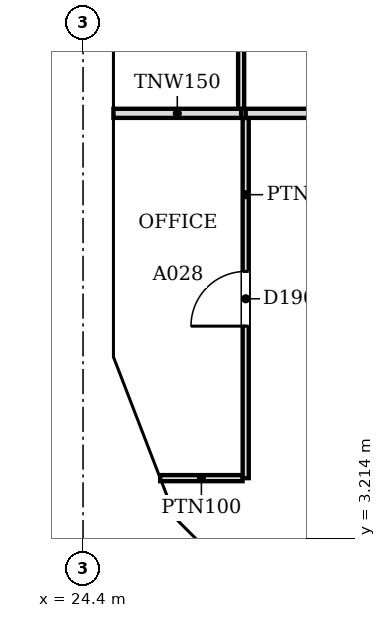
"""IFC4 building model, lengths in metres.
Left out: names, types, materials, properties, quantities, classifications, styles, units other than length and angle.
Written with IfcOpenShell. Run it as: python <this file> out.ifc"""

import sys

from ifc_helpers import new_model, si_unit, direction, frame, frame_2d, origin, place, context, subcontext, project, spatial, polyline, rectangle, outline, extrude, faceted_brep, source, transform, mapped, element, fill, save


model = new_model("IFC4")
c1 = context("Model", 3, precision=1e-05, world=origin(), true_north=direction((0.0, 1.0)))
c2 = subcontext(c1, "Body", "Model", "MODEL_VIEW")
j1 = project(units=[si_unit("LENGTHUNIT", "METRE"), si_unit("PLANEANGLEUNIT", "RADIAN")], contexts=[c1])
p1 = place(None, origin())
s1 = spatial("IfcSite", under=j1, at=p1, CompositionType="ELEMENT")
p2 = place(p1, origin())
s2 = spatial("IfcBuilding", under=s1, at=p2, CompositionType="ELEMENT")
p3 = place(p2, frame((0.0, 0.0, 25.8)))
s3 = spatial("IfcBuildingStorey", under=s2, at=p3, CompositionType="ELEMENT", Elevation=25.8)
m1 = source(origin(), c2, "Body", "Brep", [
    faceted_brep([(6.1, -0.25, 0.0), (3.096, -0.25, 3.8), (0.047, -0.25, 0.057), (0.047, -0.25, 0.0), (0.0, 0.25, 0.0), (3.096, 0.25, 3.8), (6.053, 0.25, 0.059), (6.053, 0.25, 0.0), (6.1, -0.0, 0.0), (0.0, 0.0, 0.0)], [[[0, 1, 2, 3]], [[4, 5, 6, 7]], [[6, 5, 1, 0, 8]], [[5, 4, 9, 2, 1]], [[4, 7, 8, 0, 3, 9]], [[9, 3, 2]], [[8, 7, 6]]]),
])
p4 = place(p3, frame((24.65, 12.247, 0.0), z_axis=(0.0, 0.0, 1.0), x_axis=(0.0, -1.0, 0.0)))
e1 = element("IfcWall", 1, at=p4, inside=s3, PredefinedType="SOLIDWALL", context=c2, shape_type="MappedRepresentation", body=[
    mapped(m1, transform((0.0, 0.0, 0.0), scale=1.0)),
])
m2 = source(origin(), c2, "Body", "SweptSolid", [
    extrude(outline(polyline([(5.584, 0.25), (3.094, 3.401), (0.526, 0.25), (5.584, 0.25)])), frame((0.0, 0.26, 0.0), z_axis=(0.0, -1.0, 0.0), x_axis=(1.0, 0.0, 0.0)), (0.0, 0.0, 1.0), 0.52),
])
p5 = place(p4, origin())
e2 = element("IfcOpeningElement", 2, at=p5, cuts=e1, PredefinedType="OPENING", context=c2, shape_type="MappedRepresentation", body=[
    mapped(m2, transform((0.0, 0.0, 0.0), scale=1.0)),
])
m3 = source(origin(), c2, "Body", "Brep", [
    faceted_brep([(3.003, -0.25, 3.732), (2.95, -0.25, 3.8), (0.0, -0.25, 0.0), (3.003, -0.25, 0.0), (0.047, 0.25, 0.06), (2.898, 0.25, 3.732), (2.898, 0.25, 0.0), (0.047, 0.25, 0.0), (2.95, 0.0, 3.8), (0.0, 0.0, 0.0)], [[[0, 1, 2, 3]], [[4, 5, 6, 7]], [[8, 1, 0]], [[5, 4, 9, 2, 1, 8]], [[7, 6, 3, 2, 9]], [[7, 9, 4]], [[3, 6, 5, 8, 0]]]),
])
p6 = place(p3, frame((24.65, 6.146, 0.0), z_axis=(0.0, 0.0, 1.0), x_axis=(0.359953949349, -0.932970071518, 0.0)))
e3 = element("IfcWall", 3, at=p6, inside=s3, PredefinedType="SOLIDWALL", context=c2, shape_type="MappedRepresentation", body=[
    mapped(m3, transform((0.0, 0.0, 0.0), scale=1.0)),
])
m4 = source(origin(), c2, "Body", "SweptSolid", [
    extrude(outline(polyline([(2.75, 3.135), (0.511, 0.25), (2.75, 0.25), (2.75, 3.135)])), frame((0.0, 0.26, 0.0), z_axis=(0.0, -1.0, 0.0), x_axis=(1.0, 0.0, 0.0)), (0.0, 0.0, 1.0), 0.52),
])
p7 = place(p6, origin())
e4 = element("IfcOpeningElement", 4, at=p7, cuts=e3, PredefinedType="OPENING", context=c2, shape_type="MappedRepresentation", body=[
    mapped(m4, transform((0.0, 0.0, 0.0), scale=1.0)),
])
m5 = source(origin(), c2, "Body", "Brep", [
    faceted_brep([(2.997, -0.25, 0.0), (0.053, -0.25, 3.8), (0.0, -0.25, 3.732), (0.0, -0.25, 0.0), (0.106, 0.25, 3.732), (2.944, 0.25, 0.068), (2.944, 0.25, 0.0), (0.106, 0.25, 0.0), (0.053, 0.0, 3.8), (2.997, 0.0, 0.0)], [[[0, 1, 2, 3]], [[4, 5, 6, 7]], [[5, 4, 8, 1, 0, 9]], [[2, 1, 8]], [[7, 6, 9, 0, 3]], [[7, 3, 2, 8, 4]], [[9, 6, 5]]]),
])
p8 = place(p3, frame((25.675, 3.431, 0.0), z_axis=(0.0, 0.0, 1.0), x_axis=(0.707106781187, -0.707106781187, 0.0)))
e5 = element("IfcWall", 5, at=p8, inside=s3, PredefinedType="SOLIDWALL", context=c2, shape_type="MappedRepresentation", body=[
    mapped(m5, transform((0.0, 0.0, 0.0), scale=1.0)),
])
m6 = source(origin(), c2, "Body", "SweptSolid", [
    extrude(outline(polyline([(2.487, 0.25), (0.253, 3.134), (0.253, 0.25), (2.487, 0.25)])), frame((0.0, 0.26, 0.0), z_axis=(0.0, -1.0, 0.0), x_axis=(1.0, 0.0, 0.0)), (0.0, 0.0, 1.0), 0.52),
])
p9 = place(p8, origin())
e6 = element("IfcOpeningElement", 6, at=p9, cuts=e5, PredefinedType="OPENING", context=c2, shape_type="MappedRepresentation", body=[
    mapped(m6, transform((0.0, 0.0, 0.0), scale=1.0)),
])
p10 = place(p2, frame((0.0, 0.0, 29.6)))
s4 = spatial("IfcBuildingStorey", under=s2, at=p10, CompositionType="ELEMENT", Elevation=29.6)
m7 = source(origin(), c2, "Body", "Brep", [
    faceted_brep([(0.093, -0.25, 0.057), (3.143, -0.25, 3.8), (0.093, -0.25, 7.543), (0.0, 0.25, 7.544), (0.047, 0.25, 7.6), (3.143, 0.25, 3.8), (0.047, 0.25, 0.0), (0.0, 0.25, 0.056), (0.047, 0.0, 0.0), (0.047, 0.0, 7.6)], [[[0, 1, 2]], [[3, 4, 5, 6, 7]], [[6, 5, 1, 0, 8]], [[5, 4, 9, 2, 1]], [[4, 3, 9]], [[7, 6, 8]], [[7, 8, 0, 2, 9, 3]]]),
])
p11 = place(p10, frame((24.65, 12.293, -3.8), z_axis=(0.0, 0.0, 1.0), x_axis=(0.0, -1.0, 0.0)))
e7 = element("IfcWall", 7, at=p11, inside=s4, PredefinedType="SOLIDWALL", context=c2, shape_type="MappedRepresentation", body=[
    mapped(m7, transform((0.0, 0.0, 0.0), scale=1.0)),
])
m8 = source(origin(), c2, "Body", "SweptSolid", [
    extrude(outline(polyline([(0.247, 0.641), (2.821, 3.8), (0.247, 6.959), (0.247, 0.641)])), frame((0.0, 0.26, 0.0), z_axis=(0.0, -1.0, 0.0), x_axis=(1.0, 0.0, 0.0)), (0.0, 0.0, 1.0), 0.52),
])
p12 = place(p11, origin())
e8 = element("IfcOpeningElement", 8, at=p12, cuts=e7, PredefinedType="OPENING", context=c2, shape_type="MappedRepresentation", body=[
    mapped(m8, transform((0.0, 0.0, 0.0), scale=1.0)),
])
m9 = source(origin(), c2, "Body", "Brep", [
    faceted_brep([(3.003, -0.25, 0.0), (3.05, -0.25, 0.06), (3.05, -0.25, 7.54), (3.003, -0.25, 7.6), (0.0, -0.25, 3.8), (0.0, 0.25, 3.8), (2.957, 0.25, 7.541), (2.957, 0.25, 0.059), (3.003, 0.0, 0.0), (3.003, 0.0, 7.6)], [[[0, 1, 2, 3, 4]], [[5, 6, 7]], [[1, 0, 8]], [[9, 3, 2]], [[6, 5, 4, 3, 9]], [[5, 7, 8, 0, 4]], [[1, 8, 7, 6, 9, 2]]]),
])
p13 = place(p10, frame((24.65, 9.15, -3.8), z_axis=(0.0, 0.0, 1.0), x_axis=(0.0, -1.0, 0.0)))
e9 = element("IfcWall", 9, at=p13, inside=s4, PredefinedType="SOLIDWALL", context=c2, shape_type="MappedRepresentation", body=[
    mapped(m9, transform((0.0, 0.0, 0.0), scale=1.0)),
])
m10 = source(origin(), c2, "Body", "SweptSolid", [
    extrude(outline(polyline([(2.803, 6.944), (0.319, 3.8), (2.803, 0.656), (2.803, 6.944)])), frame((0.0, 0.26, 0.0), z_axis=(0.0, -1.0, 0.0), x_axis=(1.0, 0.0, 0.0)), (0.0, 0.0, 1.0), 0.52),
])
p14 = place(p13, origin())
e10 = element("IfcOpeningElement", 10, at=p14, cuts=e9, PredefinedType="OPENING", context=c2, shape_type="MappedRepresentation", body=[
    mapped(m10, transform((0.0, 0.0, 0.0), scale=1.0)),
])
m11 = source(origin(), c2, "Body", "Brep", [
    faceted_brep([(0.047, -0.25, 0.0), (2.997, -0.25, 3.8), (0.047, -0.25, 7.6), (0.0, -0.25, 7.541), (0.0, -0.25, 0.059), (0.093, 0.25, 7.54), (2.944, 0.25, 3.868), (2.944, 0.25, 3.732), (0.093, 0.25, 0.06), (2.997, 0.0, 3.8), (0.047, 0.0, 0.0), (0.047, 0.0, 7.6)], [[[0, 1, 2, 3, 4]], [[5, 6, 7, 8]], [[8, 7, 9, 1, 0, 10]], [[6, 5, 11, 2, 1, 9]], [[3, 2, 11]], [[10, 0, 4]], [[8, 10, 4, 3, 11, 5]], [[7, 6, 9]]]),
])
p15 = place(p10, frame((24.633, 6.19, -3.8), z_axis=(0.0, 0.0, 1.0), x_axis=(0.359901446078, -0.932990326376, 0.0)))
e11 = element("IfcWall", 11, at=p15, inside=s4, PredefinedType="SOLIDWALL", context=c2, shape_type="MappedRepresentation", body=[
    mapped(m11, transform((0.0, 0.0, 0.0), scale=1.0)),
])
m12 = source(origin(), c2, "Body", "SweptSolid", [
    extrude(outline(polyline([(0.247, 0.665), (2.681, 3.8), (0.247, 6.935), (0.247, 0.665)])), frame((0.0, 0.26, 0.0), z_axis=(0.0, -1.0, 0.0), x_axis=(1.0, 0.0, 0.0)), (0.0, 0.0, 1.0), 0.52),
])
p16 = place(p15, origin())
e12 = element("IfcOpeningElement", 12, at=p16, cuts=e11, PredefinedType="OPENING", context=c2, shape_type="MappedRepresentation", body=[
    mapped(m12, transform((0.0, 0.0, 0.0), scale=1.0)),
])
m13 = source(origin(), c2, "Body", "Brep", [
    faceted_brep([(2.944, -0.25, 0.0), (2.997, -0.25, 0.068), (2.997, -0.25, 7.532), (2.944, -0.25, 7.6), (0.0, -0.25, 3.8), (0.053, 0.25, 3.868), (2.891, 0.25, 7.532), (2.891, 0.25, 0.068), (0.053, 0.25, 3.732), (2.944, 0.0, 0.0), (2.944, 0.0, 7.6), (0.0, 0.0, 3.8)], [[[0, 1, 2, 3, 4]], [[5, 6, 7, 8]], [[1, 0, 9]], [[10, 3, 2]], [[6, 5, 11, 4, 3, 10]], [[8, 7, 9, 0, 4, 11]], [[8, 11, 5]], [[1, 9, 7, 6, 10, 2]]]),
])
p17 = place(p10, frame((25.712, 3.394, -3.8), z_axis=(0.0, 0.0, 1.0), x_axis=(0.707066050402, -0.707147509625, 0.0)))
e13 = element("IfcWall", 13, at=p17, inside=s4, PredefinedType="SOLIDWALL", context=c2, shape_type="MappedRepresentation", body=[
    mapped(m13, transform((0.0, 0.0, 0.0), scale=1.0)),
])
m14 = source(origin(), c2, "Body", "SweptSolid", [
    extrude(outline(polyline([(2.744, 6.934), (0.316, 3.8), (2.744, 0.666), (2.744, 6.934)])), frame((0.0, 0.26, 0.0), z_axis=(0.0, -1.0, 0.0), x_axis=(1.0, 0.0, 0.0)), (0.0, 0.0, 1.0), 0.52),
])
p18 = place(p17, origin())
e14 = element("IfcOpeningElement", 14, at=p18, cuts=e13, PredefinedType="OPENING", context=c2, shape_type="MappedRepresentation", body=[
    mapped(m14, transform((0.0, 0.0, 0.0), scale=1.0)),
])
p19 = place(p3, frame((25.669, 4.2, 0.0), z_axis=(0.0, 0.0, 1.0), x_axis=(1.0, 0.0, 0.0)))
e15 = element("IfcWall", 15, at=p19, inside=s3, PredefinedType="PARTITIONING", context=c2, shape_type="SweptSolid", body=[
    extrude(rectangle(XDim=1.355, YDim=0.1, at=frame_2d((0.678, 0.0))), origin(), (0.0, 0.0, 1.0), 3.067),
])
p20 = place(p3, frame((27.075, 4.2, 0.0), z_axis=(0.0, 0.0, 1.0), x_axis=(0.0, 1.0, 0.0)))
e16 = element("IfcWall", 16, at=p20, inside=s3, PredefinedType="PARTITIONING", context=c2, shape_type="SweptSolid", body=[
    extrude(rectangle(XDim=5.924, YDim=0.1, at=frame_2d((2.962, 0.0))), origin(), (0.0, 0.0, 1.0), 3.067),
])
m15 = source(origin(), c2, "Body", "SweptSolid", [
    extrude(rectangle(XDim=0.9, YDim=2.1, at=frame_2d((0.45, 1.05))), frame((0.0, 0.06, 0.0), z_axis=(0.0, -1.0, 0.0), x_axis=(1.0, 0.0, 0.0)), (0.0, 0.0, 1.0), 0.12),
])
p21 = place(p20, frame((2.5, 0.0, 0.0)))
e17 = element("IfcOpeningElement", 17, at=p21, cuts=e16, PredefinedType="OPENING", context=c2, shape_type="MappedRepresentation", body=[
    mapped(m15, transform((0.0, 0.0, 0.0), scale=1.0)),
])
p22 = place(p3, frame((24.9, 10.2, 0.0), z_axis=(0.0, 0.0, 1.0), x_axis=(1.0, 0.0, 0.0)))
e18 = element("IfcWall", 18, at=p22, inside=s3, PredefinedType="PARTITIONING", context=c2, shape_type="SweptSolid", body=[
    extrude(rectangle(XDim=2.1, YDim=0.15, at=frame_2d((1.05, 0.0))), origin(), (0.0, 0.0, 1.0), 3.067),
])
p23 = place(p3, frame((27.075, 10.2, 0.0), z_axis=(0.0, 0.0, 1.0), x_axis=(1.0, 0.0, 0.0)))
e19 = element("IfcWall", 19, at=p23, inside=s3, PredefinedType="PARTITIONING", context=c2, shape_type="SweptSolid", body=[
    extrude(rectangle(XDim=15.849, YDim=0.15, at=frame_2d((7.925, 0.0))), origin(), (0.0, 0.0, 1.0), 3.067),
])
p24 = place(p3, frame((27.0, 10.276, 0.0), z_axis=(0.0, 0.0, 1.0), x_axis=(0.0, 1.0, 0.0)))
e20 = element("IfcWall", 20, at=p24, inside=s3, PredefinedType="PARTITIONING", context=c2, shape_type="SweptSolid", body=[
    extrude(rectangle(XDim=8.448, YDim=0.1, at=frame_2d((4.224, 0.0))), origin(), (0.0, 0.0, 1.0), 3.067),
])
p25 = place(p24, frame((1.6, 0.0, 0.0)))
e21 = element("IfcOpeningElement", 21, at=p25, cuts=e20, PredefinedType="OPENING", context=c2, shape_type="MappedRepresentation", body=[
    mapped(m15, transform((0.0, 0.0, 0.0), scale=1.0)),
])
p26 = place(p24, frame((5.779, 0.0, 0.0)))
e22 = element("IfcOpeningElement", 22, at=p26, cuts=e20, PredefinedType="OPENING", context=c2, shape_type="MappedRepresentation", body=[
    mapped(m15, transform((0.0, 0.0, 0.0), scale=1.0)),
])
m16 = source(origin(), c2, "Body", "SweptSolid", [
    extrude(rectangle(XDim=0.9, YDim=2.1, at=frame_2d((0.45, 1.05))), frame((0.0, 0.025, 0.0), z_axis=(0.0, -1.0, 0.0), x_axis=(1.0, 0.0, 0.0)), (0.0, 0.0, 1.0), 0.05),
])
p27 = place(p21, origin())
e23 = element("IfcDoor", 23, at=p27, inside=s3, OperationType="SINGLE_SWING_LEFT", PredefinedType="DOOR", context=c2, shape_type="MappedRepresentation", body=[
    mapped(m16, transform((0.0, 0.0, 0.0), scale=1.0)),
])
fill(e17, e23)
save(model, sys.argv[1])
